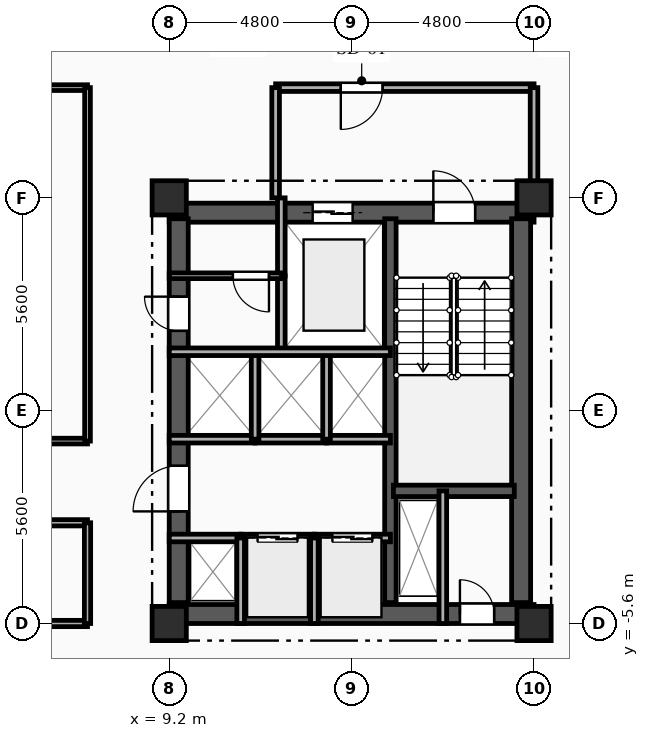
"""IFC4 building model, lengths in metres.
Left out: names, types, materials, properties, quantities, classifications, styles, units other than length and angle.
Written with IfcOpenShell. Run it as: python <this file> out.ifc"""

import sys

from ifc_helpers import new_model, si_unit, direction, frame, frame_2d, origin, origin_2d, place, context, subcontext, project, spatial, rectangle, extrude, element, fill, save


model = new_model("IFC4")
c1 = context("Model", 3, precision=1e-05, world=origin(), true_north=direction((0.0, 1.0)))
c2 = subcontext(c1, "Body", "Model", "MODEL_VIEW")
j1 = project(units=[si_unit("LENGTHUNIT", "METRE"), si_unit("PLANEANGLEUNIT", "RADIAN")], contexts=[c1])
p1 = place(None, origin())
s1 = spatial("IfcSite", under=j1, at=p1, CompositionType="ELEMENT")
p2 = place(p1, origin())
s2 = spatial("IfcBuilding", under=s1, at=p2, CompositionType="ELEMENT")
p3 = place(p2, frame((0.0, 0.0, 131.0)))
s3 = spatial("IfcBuildingStorey", under=s2, at=p3, CompositionType="ELEMENT", Elevation=131.0)
for number, where, z_axis, x_axis in (
    (1, (9.2, -5.6, 0.0), (0.0, 0.0, 1.0), (1.0, 0.0, 0.0)),
    (2, (9.2, 5.6, 0.0), (0.0, 0.0, 1.0), (1.0, 0.0, 0.0)),
    (3, (18.8, -5.6, 0.0), (0.0, 0.0, 1.0), (1.0, 0.0, 0.0)),
    (4, (18.8, 5.6, 0.0), (0.0, 0.0, 1.0), (1.0, 0.0, 0.0)),
):
    element("IfcColumn", number, at=place(p3, frame(where, z_axis=z_axis, x_axis=x_axis)), inside=s3, PredefinedType="COLUMN", context=c2, shape_type="SweptSolid", body=[
        extrude(rectangle(XDim=0.9, YDim=0.9, at=origin_2d()), origin(), (0.0, 0.0, 1.0), 3.35),
    ])
p4 = place(p3, frame((9.2, 5.21, 0.0), z_axis=(0.0, 0.0, 1.0), x_axis=(1.0, 0.0, 0.0)))
e5 = element("IfcWall", 5, at=p4, inside=s3, PredefinedType="SHEAR", context=c2, shape_type="SweptSolid", body=[
    extrude(rectangle(XDim=9.6, YDim=0.5, at=frame_2d((4.8, 0.0))), origin(), (0.0, 0.0, 1.0), 3.04),
])
p5 = place(p4, frame((6.95, 0.0, 0.0)))
e6 = element("IfcOpeningElement", 6, at=p5, cuts=e5, PredefinedType="OPENING", context=c2, shape_type="SweptSolid", body=[
    extrude(rectangle(XDim=1.1, YDim=2.15, at=frame_2d((0.55, 1.075))), frame((0.0, 0.26, 0.0), z_axis=(0.0, -1.0, 0.0), x_axis=(1.0, 0.0, 0.0)), (0.0, 0.0, 1.0), 0.52),
])
p6 = place(p4, frame((3.775, 0.0, 0.0)))
e7 = element("IfcOpeningElement", 7, at=p6, cuts=e5, PredefinedType="OPENING", context=c2, shape_type="SweptSolid", body=[
    extrude(rectangle(XDim=1.05, YDim=2.1, at=frame_2d((0.525, 1.05))), frame((0.0, 0.26, 0.0), z_axis=(0.0, -1.0, 0.0), x_axis=(1.0, 0.0, 0.0)), (0.0, 0.0, 1.0), 0.52),
])
p7 = place(p3, frame((9.2, -5.35, 0.0), z_axis=(0.0, 0.0, 1.0), x_axis=(1.0, 0.0, 0.0)))
e8 = element("IfcWall", 8, at=p7, inside=s3, PredefinedType="SHEAR", context=c2, shape_type="SweptSolid", body=[
    extrude(rectangle(XDim=9.6, YDim=0.5, at=frame_2d((4.8, 0.0))), origin(), (0.0, 0.0, 1.0), 3.04),
])
p8 = place(p7, frame((7.65, 0.0, 0.0)))
e9 = element("IfcOpeningElement", 9, at=p8, cuts=e8, PredefinedType="OPENING", context=c2, shape_type="SweptSolid", body=[
    extrude(rectangle(XDim=0.9, YDim=2.1, at=frame_2d((0.45, 1.05))), frame((0.0, 0.26, 0.0), z_axis=(0.0, -1.0, 0.0), x_axis=(1.0, 0.0, 0.0)), (0.0, 0.0, 1.0), 0.52),
])
p9 = place(p3, frame((9.45, -5.05, 0.0), z_axis=(0.0, 0.0, 1.0), x_axis=(0.0, 1.0, 0.0)))
e10 = element("IfcWall", 10, at=p9, inside=s3, PredefinedType="SHEAR", context=c2, shape_type="SweptSolid", body=[
    extrude(rectangle(XDim=10.1, YDim=0.5, at=frame_2d((5.05, 0.0))), origin(), (0.0, 0.0, 1.0), 3.04),
])
p10 = place(p9, frame((7.15, 0.0, 0.0)))
e11 = element("IfcOpeningElement", 11, at=p10, cuts=e10, PredefinedType="OPENING", context=c2, shape_type="SweptSolid", body=[
    extrude(rectangle(XDim=0.9, YDim=2.1, at=frame_2d((0.45, 1.05))), frame((0.0, 0.26, 0.0), z_axis=(0.0, -1.0, 0.0), x_axis=(1.0, 0.0, 0.0)), (0.0, 0.0, 1.0), 0.52),
])
p11 = place(p9, frame((2.4, 0.0, 0.0)))
e12 = element("IfcOpeningElement", 12, at=p11, cuts=e10, PredefinedType="OPENING", context=c2, shape_type="SweptSolid", body=[
    extrude(rectangle(XDim=1.2, YDim=2.15, at=frame_2d((0.6, 1.075))), frame((0.0, 0.26, 0.0), z_axis=(0.0, -1.0, 0.0), x_axis=(1.0, 0.0, 0.0)), (0.0, 0.0, 1.0), 0.52),
])
p12 = place(p3, frame((18.46, -5.05, 0.0), z_axis=(0.0, 0.0, 1.0), x_axis=(0.0, 1.0, 0.0)))
e13 = element("IfcWall", 13, at=p12, inside=s3, PredefinedType="SHEAR", context=c2, shape_type="SweptSolid", body=[
    extrude(rectangle(XDim=10.1, YDim=0.5, at=frame_2d((5.05, 0.0))), origin(), (0.0, 0.0, 1.0), 3.04),
])
p13 = place(p3, frame((15.02, -5.05, 0.0), z_axis=(0.0, 0.0, 1.0), x_axis=(0.0, 1.0, 0.0)))
e14 = element("IfcWall", 14, at=p13, inside=s3, PredefinedType="SHEAR", context=c2, shape_type="SweptSolid", body=[
    extrude(rectangle(XDim=10.1, YDim=0.3, at=frame_2d((5.05, 0.0))), origin(), (0.0, 0.0, 1.0), 3.04),
])
p14 = place(p3, frame((15.1, -2.11, 0.0), z_axis=(0.0, 0.0, 1.0), x_axis=(1.0, 0.0, 0.0)))
e15 = element("IfcWall", 15, at=p14, inside=s3, PredefinedType="SHEAR", context=c2, shape_type="SweptSolid", body=[
    extrude(rectangle(XDim=3.18, YDim=0.3, at=frame_2d((1.59, 0.0))), origin(), (0.0, 0.0, 1.0), 3.04),
])
p15 = place(p3, frame((16.4, -2.11, 0.0), z_axis=(0.0, 0.0, 1.0), x_axis=(0.0, -1.0, 0.0)))
e16 = element("IfcWall", 16, at=p15, inside=s3, PredefinedType="PARTITIONING", context=c2, shape_type="SweptSolid", body=[
    extrude(rectangle(XDim=3.49, YDim=0.2, at=frame_2d((1.745, 0.0))), origin(), (0.0, 0.0, 1.0), 3.04),
])
p16 = place(p3, frame((12.15, 3.55, 0.0), z_axis=(0.0, 0.0, 1.0), x_axis=(0.0, -1.0, 0.0)))
e17 = element("IfcWall", 17, at=p16, inside=s3, PredefinedType="PARTITIONING", context=c2, shape_type="SweptSolid", body=[
    extrude(rectangle(XDim=2.0, YDim=0.2, at=frame_2d((1.0, 0.0))), origin(), (0.0, 0.0, 1.0), 3.04),
])
p17 = place(p3, frame((12.15, 5.6, 0.0), z_axis=(0.0, 0.0, 1.0), x_axis=(0.0, -1.0, 0.0)))
e18 = element("IfcWall", 18, at=p17, inside=s3, PredefinedType="PARTITIONING", context=c2, shape_type="SweptSolid", body=[
    extrude(rectangle(XDim=2.05, YDim=0.2, at=frame_2d((1.025, 0.0))), origin(), (0.0, 0.0, 1.0), 3.04),
])
p18 = place(p3, frame((18.8, 8.5, 0.0), z_axis=(0.0, 0.0, 1.0), x_axis=(-1.0, 0.0, 0.0)))
e19 = element("IfcWall", 19, at=p18, inside=s3, PredefinedType="PARTITIONING", context=c2, shape_type="SweptSolid", body=[
    extrude(rectangle(XDim=6.8, YDim=0.2, at=frame_2d((3.4, 0.0))), origin(), (0.0, 0.0, 1.0), 3.04),
])
p19 = place(p18, frame((3.985, 0.0, 0.0)))
e20 = element("IfcOpeningElement", 20, at=p19, cuts=e19, PredefinedType="OPENING", context=c2, shape_type="SweptSolid", body=[
    extrude(rectangle(XDim=1.1, YDim=2.15, at=frame_2d((0.55, 1.075))), frame((0.0, 0.11, 0.0), z_axis=(0.0, -1.0, 0.0), x_axis=(1.0, 0.0, 0.0)), (0.0, 0.0, 1.0), 0.22),
])
p20 = place(p3, frame((18.8, 5.6, 0.0), z_axis=(0.0, 0.0, 1.0), x_axis=(0.0, 1.0, 0.0)))
e21 = element("IfcWall", 21, at=p20, inside=s3, PredefinedType="PARTITIONING", context=c2, shape_type="SweptSolid", body=[
    extrude(rectangle(XDim=2.9, YDim=0.2, at=frame_2d((1.45, 0.0))), origin(), (0.0, 0.0, 1.0), 2.525),
])
p21 = place(p3, frame((12.0, 8.5, 0.0), z_axis=(0.0, 0.0, 1.0), x_axis=(0.0, -1.0, 0.0)))
e22 = element("IfcWall", 22, at=p21, inside=s3, PredefinedType="PARTITIONING", context=c2, shape_type="SweptSolid", body=[
    extrude(rectangle(XDim=2.9, YDim=0.2, at=frame_2d((1.45, 0.0))), origin(), (0.0, 0.0, 1.0), 3.04),
])
p22 = place(p3, frame((12.15, 3.55, 0.0), z_axis=(0.0, 0.0, 1.0), x_axis=(-1.0, 0.0, 0.0)))
e23 = element("IfcWall", 23, at=p22, inside=s3, PredefinedType="PARTITIONING", context=c2, shape_type="SweptSolid", body=[
    extrude(rectangle(XDim=2.95, YDim=0.15, at=frame_2d((1.475, 0.0))), origin(), (0.0, 0.0, 1.0), 3.04),
])
p23 = place(p22, frame((0.325, 0.0, 0.0)))
e24 = element("IfcOpeningElement", 24, at=p23, cuts=e23, PredefinedType="OPENING", context=c2, shape_type="SweptSolid", body=[
    extrude(rectangle(XDim=0.95, YDim=2.1, at=frame_2d((0.475, 1.05))), frame((0.0, 0.085, 0.0), z_axis=(0.0, -1.0, 0.0), x_axis=(1.0, 0.0, 0.0)), (0.0, 0.0, 1.0), 0.17),
])
p24 = place(p3, frame((9.2, -3.35, 0.0), z_axis=(0.0, 0.0, 1.0), x_axis=(1.0, 0.0, 0.0)))
e25 = element("IfcWall", 25, at=p24, inside=s3, PredefinedType="PARTITIONING", context=c2, shape_type="SweptSolid", body=[
    extrude(rectangle(XDim=1.88, YDim=0.2, at=frame_2d((0.94, 0.0))), origin(), (0.0, 0.0, 1.0), 2.755),
])
p25 = place(p3, frame((11.08, -3.35, 0.0), z_axis=(0.0, 0.0, 1.0), x_axis=(1.0, 0.0, 0.0)))
e26 = element("IfcWall", 26, at=p25, inside=s3, PredefinedType="PARTITIONING", context=c2, shape_type="SweptSolid", body=[
    extrude(rectangle(XDim=1.94, YDim=0.2, at=frame_2d((0.97, 0.0))), origin(), (0.0, 0.0, 1.0), 3.04),
])
p26 = place(p25, frame((0.445, 0.0, 0.0)))
e27 = element("IfcOpeningElement", 27, at=p26, cuts=e26, PredefinedType="OPENING", context=c2, shape_type="SweptSolid", body=[
    extrude(rectangle(XDim=1.05, YDim=2.1, at=frame_2d((0.525, 1.05))), frame((0.0, 0.11, 0.0), z_axis=(0.0, -1.0, 0.0), x_axis=(1.0, 0.0, 0.0)), (0.0, 0.0, 1.0), 0.22),
])
p27 = place(p3, frame((13.02, -3.35, 0.0), z_axis=(0.0, 0.0, 1.0), x_axis=(1.0, 0.0, 0.0)))
e28 = element("IfcWall", 28, at=p27, inside=s3, PredefinedType="PARTITIONING", context=c2, shape_type="SweptSolid", body=[
    extrude(rectangle(XDim=2.0, YDim=0.2, at=frame_2d((1.0, 0.0))), origin(), (0.0, 0.0, 1.0), 3.04),
])
p28 = place(p27, frame((0.475, 0.0, 0.0)))
e29 = element("IfcOpeningElement", 29, at=p28, cuts=e28, PredefinedType="OPENING", context=c2, shape_type="SweptSolid", body=[
    extrude(rectangle(XDim=1.05, YDim=2.1, at=frame_2d((0.525, 1.05))), frame((0.0, 0.11, 0.0), z_axis=(0.0, -1.0, 0.0), x_axis=(1.0, 0.0, 0.0)), (0.0, 0.0, 1.0), 0.22),
])
p29 = place(p3, frame((11.46, -0.75, 0.0), z_axis=(0.0, 0.0, 1.0), x_axis=(-1.0, 0.0, 0.0)))
e30 = element("IfcWall", 30, at=p29, inside=s3, PredefinedType="PARTITIONING", context=c2, shape_type="SweptSolid", body=[
    extrude(rectangle(XDim=2.26, YDim=0.2, at=frame_2d((1.13, 0.0))), origin(), (0.0, 0.0, 1.0), 3.04),
])
p30 = place(p3, frame((13.34, -0.75, 0.0), z_axis=(0.0, 0.0, 1.0), x_axis=(-1.0, 0.0, 0.0)))
e31 = element("IfcWall", 31, at=p30, inside=s3, PredefinedType="PARTITIONING", context=c2, shape_type="SweptSolid", body=[
    extrude(rectangle(XDim=1.88, YDim=0.2, at=frame_2d((0.94, 0.0))), origin(), (0.0, 0.0, 1.0), 3.04),
])
p31 = place(p3, frame((15.02, -0.75, 0.0), z_axis=(0.0, 0.0, 1.0), x_axis=(-1.0, 0.0, 0.0)))
e32 = element("IfcWall", 32, at=p31, inside=s3, PredefinedType="PARTITIONING", context=c2, shape_type="SweptSolid", body=[
    extrude(rectangle(XDim=1.68, YDim=0.2, at=frame_2d((0.84, 0.0))), origin(), (0.0, 0.0, 1.0), 3.04),
])
for number, where, z_axis, x_axis in (
    (33, (11.08, -5.6, 0.0), (0.0, 0.0, 1.0), (0.0, 1.0, 0.0)),
    (34, (13.02, -5.6, 0.0), (0.0, 0.0, 1.0), (0.0, 1.0, 0.0)),
):
    element("IfcWall", number, at=place(p3, frame(where, z_axis=z_axis, x_axis=x_axis)), inside=s3, PredefinedType="PARTITIONING", context=c2, shape_type="SweptSolid", body=[
        extrude(rectangle(XDim=2.25, YDim=0.2, at=frame_2d((1.125, 0.0))), origin(), (0.0, 0.0, 1.0), 3.04),
    ])
for number, where, z_axis, x_axis in (
    (35, (11.46, -0.75, 0.0), (0.0, 0.0, 1.0), (0.0, 1.0, 0.0)),
    (36, (13.34, -0.75, 0.0), (0.0, 0.0, 1.0), (0.0, 1.0, 0.0)),
):
    element("IfcWall", number, at=place(p3, frame(where, z_axis=z_axis, x_axis=x_axis)), inside=s3, PredefinedType="PARTITIONING", context=c2, shape_type="SweptSolid", body=[
        extrude(rectangle(XDim=2.3, YDim=0.2, at=frame_2d((1.15, 0.0))), origin(), (0.0, 0.0, 1.0), 3.04),
    ])
p32 = place(p3, frame((7.05, 8.5, 0.0), z_axis=(0.0, 0.0, 1.0), x_axis=(-1.0, 0.0, 0.0)))
e37 = element("IfcWall", 37, at=p32, inside=s3, PredefinedType="PARTITIONING", context=c2, shape_type="SweptSolid", body=[
    extrude(rectangle(XDim=7.05, YDim=0.15, at=frame_2d((3.525, 0.0))), origin(), (0.0, 0.0, 1.0), 3.04),
])
p33 = place(p3, frame((0.0, -5.6, 0.0), z_axis=(0.0, 0.0, 1.0), x_axis=(1.0, 0.0, 0.0)))
e38 = element("IfcWall", 38, at=p33, inside=s3, PredefinedType="PARTITIONING", context=c2, shape_type="SweptSolid", body=[
    extrude(rectangle(XDim=7.05, YDim=0.165, at=frame_2d((3.525, 0.0))), origin(), (0.0, 0.0, 1.0), 2.525),
])
p34 = place(p3, frame((-7.05, -0.8, 0.0), z_axis=(0.0, 0.0, 1.0), x_axis=(1.0, 0.0, 0.0)))
e39 = element("IfcWall", 39, at=p34, inside=s3, PredefinedType="PARTITIONING", context=c2, shape_type="SweptSolid", body=[
    extrude(rectangle(XDim=14.1, YDim=0.15, at=frame_2d((7.05, 0.0))), origin(), (0.0, 0.0, 1.0), 3.04),
])
p35 = place(p34, frame((6.525, 0.0, 0.0)))
e40 = element("IfcOpeningElement", 40, at=p35, cuts=e39, PredefinedType="OPENING", context=c2, shape_type="SweptSolid", body=[
    extrude(rectangle(XDim=1.05, YDim=2.15, at=frame_2d((0.525, 1.075))), frame((0.0, 0.085, 0.0), z_axis=(0.0, -1.0, 0.0), x_axis=(1.0, 0.0, 0.0)), (0.0, 0.0, 1.0), 0.17),
])
p36 = place(p3, frame((7.05, -2.95, 0.0), z_axis=(0.0, 0.0, 1.0), x_axis=(-1.0, 0.0, 0.0)))
e41 = element("IfcWall", 41, at=p36, inside=s3, PredefinedType="PARTITIONING", context=c2, shape_type="SweptSolid", body=[
    extrude(rectangle(XDim=14.1, YDim=0.165, at=frame_2d((7.05, 0.0))), origin(), (0.0, 0.0, 1.0), 3.04),
])
p37 = place(p36, frame((6.475, 0.0, 0.0)))
e42 = element("IfcOpeningElement", 42, at=p37, cuts=e41, PredefinedType="OPENING", context=c2, shape_type="SweptSolid", body=[
    extrude(rectangle(XDim=1.15, YDim=2.15, at=frame_2d((0.575, 1.075))), frame((0.0, 0.093, 0.0), z_axis=(0.0, -1.0, 0.0), x_axis=(1.0, 0.0, 0.0)), (0.0, 0.0, 1.0), 0.185),
])
p38 = place(p3, frame((7.05, -0.8, 0.0), z_axis=(0.0, 0.0, 1.0), x_axis=(0.0, 1.0, 0.0)))
e43 = element("IfcWall", 43, at=p38, inside=s3, PredefinedType="PARTITIONING", context=c2, shape_type="SweptSolid", body=[
    extrude(rectangle(XDim=9.3, YDim=0.15, at=frame_2d((4.65, 0.0))), origin(), (0.0, 0.0, 1.0), 3.04),
])
p39 = place(p3, frame((7.05, -5.6, 0.0), z_axis=(0.0, 0.0, 1.0), x_axis=(0.0, 1.0, 0.0)))
e44 = element("IfcWall", 44, at=p39, inside=s3, PredefinedType="PARTITIONING", context=c2, shape_type="SweptSolid", body=[
    extrude(rectangle(XDim=2.65, YDim=0.165, at=frame_2d((1.325, 0.0))), origin(), (0.0, 0.0, 1.0), 3.04),
])
p40 = place(p3, frame((9.2, 1.55, 0.0), z_axis=(0.0, 0.0, 1.0), x_axis=(1.0, 0.0, 0.0)))
e45 = element("IfcWall", 45, at=p40, inside=s3, PredefinedType="PARTITIONING", context=c2, shape_type="SweptSolid", body=[
    extrude(rectangle(XDim=5.82, YDim=0.2, at=frame_2d((2.91, 0.0))), origin(), (0.0, 0.0, 1.0), 3.04),
])
p41 = place(p5, origin())
e46 = element("IfcDoor", 46, at=p41, inside=s3, OperationType="SINGLE_SWING_LEFT", PredefinedType="DOOR", context=c2, shape_type="SweptSolid", body=[
    extrude(rectangle(XDim=1.1, YDim=2.15, at=frame_2d((0.55, 1.075))), frame((0.0, 0.025, 0.0), z_axis=(0.0, -1.0, 0.0), x_axis=(1.0, 0.0, 0.0)), (0.0, 0.0, 1.0), 0.05),
])
fill(e6, e46)
p42 = place(p6, origin())
e47 = element("IfcDoor", 47, at=p42, inside=s3, OperationType="DOUBLE_DOOR_SLIDING", PredefinedType="DOOR", context=c2, shape_type="SweptSolid", body=[
    extrude(rectangle(XDim=1.05, YDim=2.1, at=frame_2d((0.525, 1.05))), frame((0.0, 0.025, 0.0), z_axis=(0.0, -1.0, 0.0), x_axis=(1.0, 0.0, 0.0)), (0.0, 0.0, 1.0), 0.05),
])
fill(e7, e47)
p43 = place(p8, origin())
e48 = element("IfcDoor", 48, at=p43, inside=s3, OperationType="SINGLE_SWING_LEFT", PredefinedType="DOOR", context=c2, shape_type="SweptSolid", body=[
    extrude(rectangle(XDim=0.9, YDim=2.1, at=frame_2d((0.45, 1.05))), frame((0.0, 0.025, 0.0), z_axis=(0.0, -1.0, 0.0), x_axis=(1.0, 0.0, 0.0)), (0.0, 0.0, 1.0), 0.05),
])
fill(e9, e48)
p44 = place(p19, origin())
e49 = element("IfcDoor", 49, at=p44, inside=s3, OperationType="SINGLE_SWING_RIGHT", PredefinedType="DOOR", context=c2, shape_type="SweptSolid", body=[
    extrude(rectangle(XDim=1.1, YDim=2.15, at=frame_2d((0.55, 1.075))), frame((0.0, 0.025, 0.0), z_axis=(0.0, -1.0, 0.0), x_axis=(1.0, 0.0, 0.0)), (0.0, 0.0, 1.0), 0.05),
])
fill(e20, e49)
p45 = place(p23, origin())
e50 = element("IfcDoor", 50, at=p45, inside=s3, OperationType="SINGLE_SWING_LEFT", PredefinedType="DOOR", context=c2, shape_type="SweptSolid", body=[
    extrude(rectangle(XDim=0.95, YDim=2.1, at=frame_2d((0.475, 1.05))), frame((0.0, 0.025, 0.0), z_axis=(0.0, -1.0, 0.0), x_axis=(1.0, 0.0, 0.0)), (0.0, 0.0, 1.0), 0.05),
])
fill(e24, e50)
p46 = place(p10, origin())
e51 = element("IfcDoor", 51, at=p46, inside=s3, OperationType="SINGLE_SWING_RIGHT", PredefinedType="DOOR", context=c2, shape_type="SweptSolid", body=[
    extrude(rectangle(XDim=0.9, YDim=2.1, at=frame_2d((0.45, 1.05))), frame((0.0, 0.025, 0.0), z_axis=(0.0, -1.0, 0.0), x_axis=(1.0, 0.0, 0.0)), (0.0, 0.0, 1.0), 0.05),
])
fill(e11, e51)
p47 = place(p26, origin())
e52 = element("IfcDoor", 52, at=p47, inside=s3, OperationType="DOUBLE_DOOR_SLIDING", PredefinedType="DOOR", context=c2, shape_type="SweptSolid", body=[
    extrude(rectangle(XDim=1.05, YDim=2.1, at=frame_2d((0.525, 1.05))), frame((0.0, 0.025, 0.0), z_axis=(0.0, -1.0, 0.0), x_axis=(1.0, 0.0, 0.0)), (0.0, 0.0, 1.0), 0.05),
])
fill(e27, e52)
p48 = place(p28, origin())
e53 = element("IfcDoor", 53, at=p48, inside=s3, OperationType="DOUBLE_DOOR_SLIDING", PredefinedType="DOOR", context=c2, shape_type="SweptSolid", body=[
    extrude(rectangle(XDim=1.05, YDim=2.1, at=frame_2d((0.525, 1.05))), frame((0.0, 0.025, 0.0), z_axis=(0.0, -1.0, 0.0), x_axis=(1.0, 0.0, 0.0)), (0.0, 0.0, 1.0), 0.05),
])
fill(e29, e53)
p49 = place(p11, origin())
e54 = element("IfcDoor", 54, at=p49, inside=s3, OperationType="SINGLE_SWING_LEFT", PredefinedType="DOOR", context=c2, shape_type="SweptSolid", body=[
    extrude(rectangle(XDim=1.2, YDim=2.15, at=frame_2d((0.6, 1.075))), frame((0.0, 0.025, 0.0), z_axis=(0.0, -1.0, 0.0), x_axis=(1.0, 0.0, 0.0)), (0.0, 0.0, 1.0), 0.05),
])
fill(e12, e54)
save(model, sys.argv[1])
